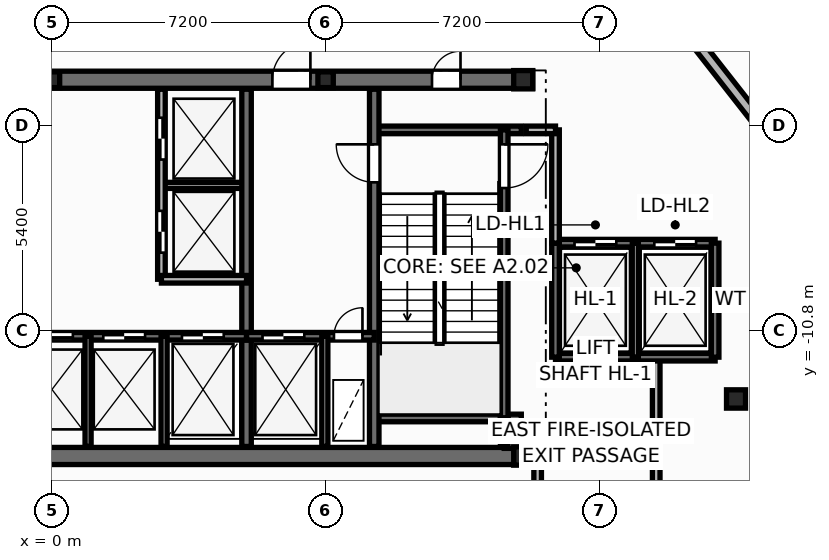
"""IFC4 building model, lengths in metres.
Left out: names, types, materials, properties, quantities, classifications, styles, units other than length and angle.
Written with IfcOpenShell. Run it as: python <this file> out.ifc"""

import sys

from ifc_helpers import new_model, si_unit, direction, frame, frame_2d, origin, origin_2d, place, context, subcontext, project, spatial, rectangle, i_section, extrude, element, fill, save


model = new_model("IFC4")
c1 = context("Model", 3, precision=1e-05, world=origin(), true_north=direction((0.0, 1.0)))
c2 = subcontext(c1, "Body", "Model", "MODEL_VIEW")
j1 = project(units=[si_unit("LENGTHUNIT", "METRE"), si_unit("PLANEANGLEUNIT", "RADIAN")], contexts=[c1])
p1 = place(None, origin())
s1 = spatial("IfcSite", under=j1, at=p1, CompositionType="ELEMENT")
p2 = place(p1, origin())
s2 = spatial("IfcBuilding", under=s1, at=p2, CompositionType="ELEMENT")
p3 = place(p2, origin())
s3 = spatial("IfcBuildingStorey", under=s2, at=p3, CompositionType="ELEMENT", Elevation=0.0)
for number, where, z_axis, x_axis in (
    (1, (12.4, -14.1, 0.0), (0.0, 0.0, 1.0), (1.0, 0.0, 0.0)),
    (2, (12.4, -4.2, 0.0), (0.0, 0.0, 1.0), (1.0, 0.0, 0.0)),
):
    element("IfcColumn", number, at=place(p3, frame(where, z_axis=z_axis, x_axis=x_axis)), inside=s3, PredefinedType="COLUMN", context=c2, shape_type="SweptSolid", body=[
        extrude(i_section(OverallWidth=0.5, OverallDepth=0.482, WebThickness=0.04, FlangeThickness=0.045, at=origin_2d()), origin(), (0.0, 0.0, 1.0), 5.4),
    ])
for number, where, z_axis, x_axis in (
    (3, (0.0, -4.2, 0.0), (0.0, 0.0, 1.0), (1.0, 0.0, 0.0)),
    (4, (7.2, -4.2, 0.0), (0.0, 0.0, 1.0), (1.0, 0.0, 0.0)),
):
    element("IfcColumn", number, at=place(p3, frame(where, z_axis=z_axis, x_axis=x_axis)), inside=s3, PredefinedType="PILASTER", context=c2, shape_type="SweptSolid", body=[
        extrude(i_section(OverallWidth=0.405, OverallDepth=0.414, WebThickness=0.022, FlangeThickness=0.032, at=origin_2d()), origin(), (0.0, 0.0, 1.0), 5.4),
    ])
p4 = place(p3, frame((18.0, -12.6, 0.0), z_axis=(0.0, 0.0, 1.0), x_axis=(1.0, 0.0, 0.0)))
e5 = element("IfcColumn", 5, at=p4, inside=s3, PredefinedType="COLUMN", context=c2, shape_type="SweptSolid", body=[
    extrude(i_section(OverallWidth=0.5, OverallDepth=0.482, WebThickness=0.04, FlangeThickness=0.045, at=origin_2d()), origin(), (0.0, 0.0, 1.0), 5.4),
])
p5 = place(p3, frame((23.245, -11.24, -0.015), z_axis=(0.0, 0.0, 1.0), x_axis=(-0.616936653938, -0.787012811222, 0.0)))
e6 = element("IfcWall", 6, at=p5, inside=s3, PredefinedType="STANDARD", context=c2, shape_type="SweptSolid", body=[
    extrude(rectangle(XDim=8.399, YDim=0.28, at=frame_2d((4.199, 0.0))), origin(), (0.0, 0.0, 1.0), 5.135),
])
p6 = place(p5, frame((0.22, 0.0, 0.015)))
e7 = element("IfcOpeningElement", 7, at=p6, cuts=e6, PredefinedType="OPENING", context=c2, shape_type="SweptSolid", body=[
    extrude(rectangle(XDim=1.206, YDim=2.154, at=frame_2d((0.6, 1.077))), frame((0.0, 0.15, 0.0), z_axis=(0.0, -1.0, 0.0), x_axis=(1.0, 0.0, 0.0)), (0.0, 0.0, 1.0), 0.3),
])
p7 = place(p3, frame((5.583, 11.29, -0.015), z_axis=(0.0, 0.0, 1.0), x_axis=(0.616945483616, -0.787005889588, 0.0)))
e8 = element("IfcWall", 8, at=p7, inside=s3, PredefinedType="STANDARD", context=c2, shape_type="SweptSolid", body=[
    extrude(rectangle(XDim=28.627, YDim=0.28, at=frame_2d((14.314, 0.0))), origin(), (0.0, 0.0, 1.0), 3.91),
])
p8 = place(p7, frame((2.979, 0.0, 0.015)))
e9 = element("IfcOpeningElement", 9, at=p8, cuts=e8, PredefinedType="OPENING", context=c2, shape_type="SweptSolid", body=[
    extrude(rectangle(XDim=1.206, YDim=2.154, at=frame_2d((0.6, 1.077))), frame((0.0, 0.15, 0.0), z_axis=(0.0, -1.0, 0.0), x_axis=(1.0, 0.0, 0.0)), (0.0, 0.0, 1.0), 0.3),
])
p9 = place(p3, frame((2.88, -6.98, 0.0), z_axis=(0.0, 0.0, 1.0), x_axis=(1.0, 0.0, 0.0)))
e10 = element("IfcWall", 10, at=p9, inside=s3, PredefinedType="PARTITIONING", context=c2, shape_type="SweptSolid", body=[
    extrude(rectangle(XDim=2.24, YDim=0.16, at=frame_2d((1.12, 0.0))), origin(), (0.0, 0.0, 1.0), 5.12),
])
p10 = place(p3, frame((-12.75, -14.1, 0.0), z_axis=(0.0, 0.0, 1.0), x_axis=(1.0, 0.0, 0.0)))
e11 = element("IfcWall", 11, at=p10, inside=s3, PredefinedType="SHEAR", context=c2, shape_type="SweptSolid", body=[
    extrude(rectangle(XDim=25.5, YDim=0.45, at=frame_2d((12.75, 0.0))), origin(), (0.0, 0.0, 1.0), 5.4),
])
p11 = place(p3, frame((-12.65, -4.2, 0.0), z_axis=(0.0, 0.0, 1.0), x_axis=(1.0, 0.0, 0.0)))
e12 = element("IfcWall", 12, at=p11, inside=s3, PredefinedType="SHEAR", context=c2, shape_type="SweptSolid", body=[
    extrude(rectangle(XDim=25.3, YDim=0.45, at=frame_2d((12.65, 0.0))), origin(), (0.0, 0.0, 1.0), 5.4),
])
p12 = place(p11, frame((1.85, 0.0, 0.0)))
e13 = element("IfcOpeningElement", 13, at=p12, cuts=e12, PredefinedType="OPENING", context=c2, shape_type="SweptSolid", body=[
    extrude(rectangle(XDim=0.756, YDim=2.054, at=frame_2d((0.375, 1.027))), frame((0.0, 0.235, 0.0), z_axis=(0.0, -1.0, 0.0), x_axis=(1.0, 0.0, 0.0)), (0.0, 0.0, 1.0), 0.47),
])
p13 = place(p11, frame((22.65, 0.0, 0.0)))
e14 = element("IfcOpeningElement", 14, at=p13, cuts=e12, PredefinedType="OPENING", context=c2, shape_type="SweptSolid", body=[
    extrude(rectangle(XDim=0.756, YDim=2.054, at=frame_2d((0.375, 1.027))), frame((0.0, 0.235, 0.0), z_axis=(0.0, -1.0, 0.0), x_axis=(1.0, 0.0, 0.0)), (0.0, 0.0, 1.0), 0.47),
])
p14 = place(p11, frame((5.85, 0.0, 0.0)))
e15 = element("IfcOpeningElement", 15, at=p14, cuts=e12, PredefinedType="OPENING", context=c2, shape_type="SweptSolid", body=[
    extrude(rectangle(XDim=1.006, YDim=2.104, at=frame_2d((0.5, 1.052))), frame((0.0, 0.235, 0.0), z_axis=(0.0, -1.0, 0.0), x_axis=(1.0, 0.0, 0.0)), (0.0, 0.0, 1.0), 0.47),
])
p15 = place(p11, frame((10.35, 0.0, 0.0)))
e16 = element("IfcOpeningElement", 16, at=p15, cuts=e12, PredefinedType="OPENING", context=c2, shape_type="SweptSolid", body=[
    extrude(rectangle(XDim=1.406, YDim=2.154, at=frame_2d((0.7, 1.077))), frame((0.0, 0.235, 0.0), z_axis=(0.0, -1.0, 0.0), x_axis=(1.0, 0.0, 0.0)), (0.0, 0.0, 1.0), 0.47),
])
p16 = place(p11, frame((18.45, 0.0, 0.0)))
e17 = element("IfcOpeningElement", 17, at=p16, cuts=e12, PredefinedType="OPENING", context=c2, shape_type="SweptSolid", body=[
    extrude(rectangle(XDim=1.006, YDim=2.104, at=frame_2d((0.5, 1.052))), frame((0.0, 0.235, 0.0), z_axis=(0.0, -1.0, 0.0), x_axis=(1.0, 0.0, 0.0)), (0.0, 0.0, 1.0), 0.47),
])
for number, where, z_axis, x_axis in (
    (18, (8.48, -5.52, 0.0), (0.0, 0.0, 1.0), (1.0, 0.0, 0.0)),
    (19, (8.48, -13.1, 0.0), (0.0, 0.0, 1.0), (1.0, 0.0, 0.0)),
):
    element("IfcWall", number, at=place(p3, frame(where, z_axis=z_axis, x_axis=x_axis)), inside=s3, PredefinedType="SOLIDWALL", context=c2, shape_type="SweptSolid", body=[
        extrude(rectangle(XDim=3.87, YDim=0.2, at=frame_2d((1.935, 0.0))), origin(), (0.0, 0.0, 1.0), 5.4),
    ])
p17 = place(p3, frame((11.9, -5.52, 0.0), z_axis=(0.0, 0.0, 1.0), x_axis=(0.0, -1.0, 0.0)))
e20 = element("IfcWall", 20, at=p17, inside=s3, PredefinedType="SOLIDWALL", context=c2, shape_type="SweptSolid", body=[
    extrude(rectangle(XDim=7.58, YDim=0.2, at=frame_2d((3.79, 0.0))), origin(), (0.0, 0.0, 1.0), 5.4),
])
p18 = place(p17, frame((0.38, 0.0, 0.0)))
e21 = element("IfcOpeningElement", 21, at=p18, cuts=e20, PredefinedType="OPENING", context=c2, shape_type="SweptSolid", body=[
    extrude(rectangle(XDim=1.156, YDim=2.154, at=frame_2d((0.575, 1.077))), frame((0.0, 0.11, 0.0), z_axis=(0.0, -1.0, 0.0), x_axis=(1.0, 0.0, 0.0)), (0.0, 0.0, 1.0), 0.22),
])
p19 = place(p3, frame((8.48, -13.85, 0.0), z_axis=(0.0, 0.0, 1.0), x_axis=(0.0, 1.0, 0.0)))
e22 = element("IfcWall", 22, at=p19, inside=s3, PredefinedType="SHEAR", context=c2, shape_type="SweptSolid", body=[
    extrude(rectangle(XDim=9.4, YDim=0.25, at=frame_2d((4.7, 0.0))), origin(), (0.0, 0.0, 1.0), 5.4),
])
p20 = place(p19, frame((6.95, 0.0, 0.0)))
e23 = element("IfcOpeningElement", 23, at=p20, cuts=e22, PredefinedType="OPENING", context=c2, shape_type="SweptSolid", body=[
    extrude(rectangle(XDim=1.006, YDim=2.104, at=frame_2d((0.5, 1.052))), frame((0.0, 0.135, 0.0), z_axis=(0.0, -1.0, 0.0), x_axis=(1.0, 0.0, 0.0)), (0.0, 0.0, 1.0), 0.27),
])
p21 = place(p3, frame((5.12, -13.85, 0.0), z_axis=(0.0, 0.0, 1.0), x_axis=(0.0, 1.0, 0.0)))
e24 = element("IfcWall", 24, at=p21, inside=s3, PredefinedType="SHEAR", context=c2, shape_type="SweptSolid", body=[
    extrude(rectangle(XDim=9.4, YDim=0.25, at=frame_2d((4.7, 0.0))), origin(), (0.0, 0.0, 1.0), 5.4),
])
p22 = place(p3, frame((-5.12, -10.95, 0.0), z_axis=(0.0, 0.0, 1.0), x_axis=(1.0, 0.0, 0.0)))
e25 = element("IfcWall", 25, at=p22, inside=s3, PredefinedType="SOLIDWALL", context=c2, shape_type="SweptSolid", body=[
    extrude(rectangle(XDim=10.24, YDim=0.2, at=frame_2d((5.12, 0.0))), origin(), (0.0, 0.0, 1.0), 5.4),
])
p23 = place(p22, frame((0.6, 0.0, 0.0)))
e26 = element("IfcOpeningElement", 26, at=p23, cuts=e25, PredefinedType="OPENING", context=c2, shape_type="SweptSolid", body=[
    extrude(rectangle(XDim=1.106, YDim=2.104, at=frame_2d((0.55, 1.052))), frame((0.0, 0.11, 0.0), z_axis=(0.0, -1.0, 0.0), x_axis=(1.0, 0.0, 0.0)), (0.0, 0.0, 1.0), 0.22),
])
p24 = place(p22, frame((2.67, 0.0, 0.0)))
e27 = element("IfcOpeningElement", 27, at=p24, cuts=e25, PredefinedType="OPENING", context=c2, shape_type="SweptSolid", body=[
    extrude(rectangle(XDim=1.106, YDim=2.104, at=frame_2d((0.55, 1.052))), frame((0.0, 0.11, 0.0), z_axis=(0.0, -1.0, 0.0), x_axis=(1.0, 0.0, 0.0)), (0.0, 0.0, 1.0), 0.22),
])
p25 = place(p22, frame((4.57, 0.0, 0.0)))
e28 = element("IfcOpeningElement", 28, at=p25, cuts=e25, PredefinedType="OPENING", context=c2, shape_type="SweptSolid", body=[
    extrude(rectangle(XDim=1.106, YDim=2.104, at=frame_2d((0.55, 1.052))), frame((0.0, 0.11, 0.0), z_axis=(0.0, -1.0, 0.0), x_axis=(1.0, 0.0, 0.0)), (0.0, 0.0, 1.0), 0.22),
])
p26 = place(p22, frame((6.47, 0.0, 0.0)))
e29 = element("IfcOpeningElement", 29, at=p26, cuts=e25, PredefinedType="OPENING", context=c2, shape_type="SweptSolid", body=[
    extrude(rectangle(XDim=1.106, YDim=2.104, at=frame_2d((0.55, 1.052))), frame((0.0, 0.11, 0.0), z_axis=(0.0, -1.0, 0.0), x_axis=(1.0, 0.0, 0.0)), (0.0, 0.0, 1.0), 0.22),
])
p27 = place(p22, frame((8.54, 0.0, 0.0)))
e30 = element("IfcOpeningElement", 30, at=p27, cuts=e25, PredefinedType="OPENING", context=c2, shape_type="SweptSolid", body=[
    extrude(rectangle(XDim=1.106, YDim=2.104, at=frame_2d((0.55, 1.052))), frame((0.0, 0.11, 0.0), z_axis=(0.0, -1.0, 0.0), x_axis=(1.0, 0.0, 0.0)), (0.0, 0.0, 1.0), 0.22),
])
p28 = place(p3, frame((5.12, -10.95, 0.0), z_axis=(0.0, 0.0, 1.0), x_axis=(1.0, 0.0, 0.0)))
e31 = element("IfcWall", 31, at=p28, inside=s3, PredefinedType="SOLIDWALL", context=c2, shape_type="SweptSolid", body=[
    extrude(rectangle(XDim=3.36, YDim=0.2, at=frame_2d((1.68, 0.0))), origin(), (0.0, 0.0, 1.0), 5.4),
])
p29 = place(p28, frame((0.42, 0.0, 0.0)))
e32 = element("IfcOpeningElement", 32, at=p29, cuts=e31, PredefinedType="OPENING", context=c2, shape_type="SweptSolid", body=[
    extrude(rectangle(XDim=1.106, YDim=2.104, at=frame_2d((0.55, 1.052))), frame((0.0, 0.11, 0.0), z_axis=(0.0, -1.0, 0.0), x_axis=(1.0, 0.0, 0.0)), (0.0, 0.0, 1.0), 0.22),
])
p30 = place(p28, frame((2.3, 0.0, 0.0)))
e33 = element("IfcOpeningElement", 33, at=p30, cuts=e31, PredefinedType="OPENING", context=c2, shape_type="SweptSolid", body=[
    extrude(rectangle(XDim=0.756, YDim=2.054, at=frame_2d((0.375, 1.027))), frame((0.0, 0.11, 0.0), z_axis=(0.0, -1.0, 0.0), x_axis=(1.0, 0.0, 0.0)), (0.0, 0.0, 1.0), 0.22),
])
for number, where, z_axis, x_axis in (
    (34, (7.18, -13.85, 0.0), (0.0, 0.0, 1.0), (0.0, 1.0, 0.0)),
    (35, (2.95, -13.85, 0.0), (0.0, 0.0, 1.0), (0.0, 1.0, 0.0)),
):
    element("IfcWall", number, at=place(p3, frame(where, z_axis=z_axis, x_axis=x_axis)), inside=s3, PredefinedType="PARTITIONING", context=c2, shape_type="SweptSolid", body=[
        extrude(rectangle(XDim=2.9, YDim=0.16, at=frame_2d((1.45, 0.0))), origin(), (0.0, 0.0, 1.0), 4.145),
    ])
p31 = place(p3, frame((2.88, -9.45, 0.0), z_axis=(0.0, 0.0, 1.0), x_axis=(0.0, 1.0, 0.0)))
e36 = element("IfcWall", 36, at=p31, inside=s3, PredefinedType="SOLIDWALL", context=c2, shape_type="SweptSolid", body=[
    extrude(rectangle(XDim=5.0, YDim=0.2, at=frame_2d((2.5, 0.0))), origin(), (0.0, 0.0, 1.0), 5.12),
])
p32 = place(p31, frame((0.7, 0.0, 0.0)))
e37 = element("IfcOpeningElement", 37, at=p32, cuts=e36, PredefinedType="OPENING", context=c2, shape_type="SweptSolid", body=[
    extrude(rectangle(XDim=1.106, YDim=2.104, at=frame_2d((0.55, 1.052))), frame((0.0, 0.11, 0.0), z_axis=(0.0, -1.0, 0.0), x_axis=(1.0, 0.0, 0.0)), (0.0, 0.0, 1.0), 0.22),
])
p33 = place(p31, frame((3.15, 0.0, 0.0)))
e38 = element("IfcOpeningElement", 38, at=p33, cuts=e36, PredefinedType="OPENING", context=c2, shape_type="SweptSolid", body=[
    extrude(rectangle(XDim=1.106, YDim=2.104, at=frame_2d((0.55, 1.052))), frame((0.0, 0.11, 0.0), z_axis=(0.0, -1.0, 0.0), x_axis=(1.0, 0.0, 0.0)), (0.0, 0.0, 1.0), 0.22),
])
p34 = place(p3, frame((2.88, -9.45, 0.0), z_axis=(0.0, 0.0, 1.0), x_axis=(1.0, 0.0, 0.0)))
e39 = element("IfcWall", 39, at=p34, inside=s3, PredefinedType="SOLIDWALL", context=c2, shape_type="SweptSolid", body=[
    extrude(rectangle(XDim=2.24, YDim=0.2, at=frame_2d((1.12, 0.0))), origin(), (0.0, 0.0, 1.0), 5.12),
])
p35 = place(p3, frame((0.95, -13.85, 0.0), z_axis=(0.0, 0.0, 1.0), x_axis=(0.0, 1.0, 0.0)))
e40 = element("IfcWall", 40, at=p35, inside=s3, PredefinedType="PARTITIONING", context=c2, shape_type="SweptSolid", body=[
    extrude(rectangle(XDim=2.9, YDim=0.16, at=frame_2d((1.45, 0.0))), origin(), (0.0, 0.0, 1.0), 4.145),
])
p36 = place(p3, frame((15.9, -17.85, 0.0), z_axis=(0.0, 0.0, 1.0), x_axis=(0.0, 1.0, 0.0)))
e41 = element("IfcWall", 41, at=p36, inside=s3, PredefinedType="SOLIDWALL", context=c2, shape_type="SweptSolid", body=[
    extrude(rectangle(XDim=6.35, YDim=0.2, at=frame_2d((3.175, 0.0))), origin(), (0.0, 0.0, 1.0), 5.12),
])
p37 = place(p3, frame((13.25, -11.5, 0.0), z_axis=(0.0, 0.0, 1.0), x_axis=(1.0, 0.0, 0.0)))
e42 = element("IfcWall", 42, at=p37, inside=s3, PredefinedType="SOLIDWALL", context=c2, shape_type="SweptSolid", body=[
    extrude(rectangle(XDim=4.2, YDim=0.2, at=frame_2d((2.1, 0.0))), origin(), (0.0, 0.0, 1.0), 5.4),
])
p38 = place(p3, frame((13.25, -8.5, 0.0), z_axis=(0.0, 0.0, 1.0), x_axis=(1.0, 0.0, 0.0)))
e43 = element("IfcWall", 43, at=p38, inside=s3, PredefinedType="SOLIDWALL", context=c2, shape_type="SweptSolid", body=[
    extrude(rectangle(XDim=4.2, YDim=0.2, at=frame_2d((2.1, 0.0))), origin(), (0.0, 0.0, 1.0), 5.4),
])
p39 = place(p38, frame((0.5, 0.0, 0.0)))
e44 = element("IfcOpeningElement", 44, at=p39, cuts=e43, PredefinedType="OPENING", context=c2, shape_type="SweptSolid", body=[
    extrude(rectangle(XDim=1.106, YDim=2.104, at=frame_2d((0.55, 1.052))), frame((0.0, 0.11, 0.0), z_axis=(0.0, -1.0, 0.0), x_axis=(1.0, 0.0, 0.0)), (0.0, 0.0, 1.0), 0.22),
])
p40 = place(p38, frame((2.6, 0.0, 0.0)))
e45 = element("IfcOpeningElement", 45, at=p40, cuts=e43, PredefinedType="OPENING", context=c2, shape_type="SweptSolid", body=[
    extrude(rectangle(XDim=1.106, YDim=2.104, at=frame_2d((0.55, 1.052))), frame((0.0, 0.11, 0.0), z_axis=(0.0, -1.0, 0.0), x_axis=(1.0, 0.0, 0.0)), (0.0, 0.0, 1.0), 0.22),
])
p41 = place(p3, frame((12.78, -17.85, 0.0), z_axis=(0.0, 0.0, 1.0), x_axis=(0.0, 1.0, 0.0)))
e46 = element("IfcWall", 46, at=p41, inside=s3, PredefinedType="SOLIDWALL", context=c2, shape_type="SweptSolid", body=[
    extrude(rectangle(XDim=4.05, YDim=0.2, at=frame_2d((2.025, 0.0))), origin(), (0.0, 0.0, 1.0), 5.12),
])
for number, where, z_axis, x_axis in (
    (47, (13.25, -11.5, 0.0), (0.0, 0.0, 1.0), (0.0, 1.0, 0.0)),
    (48, (17.45, -11.5, 0.0), (0.0, 0.0, 1.0), (0.0, 1.0, 0.0)),
):
    element("IfcWall", number, at=place(p3, frame(where, z_axis=z_axis, x_axis=x_axis)), inside=s3, PredefinedType="SOLIDWALL", context=c2, shape_type="SweptSolid", body=[
        extrude(rectangle(XDim=3.0, YDim=0.2, at=frame_2d((1.5, 0.0))), origin(), (0.0, 0.0, 1.0), 5.4),
    ])
p42 = place(p3, frame((15.35, -11.5, 0.0), z_axis=(0.0, 0.0, 1.0), x_axis=(0.0, 1.0, 0.0)))
e49 = element("IfcWall", 49, at=p42, inside=s3, PredefinedType="PARTITIONING", context=c2, shape_type="SweptSolid", body=[
    extrude(rectangle(XDim=3.0, YDim=0.16, at=frame_2d((1.5, 0.0))), origin(), (0.0, 0.0, 1.0), 5.12),
])
p43 = place(p3, frame((13.25, -8.5, 0.0), z_axis=(0.0, 0.0, 1.0), x_axis=(0.0, 1.0, 0.0)))
e50 = element("IfcWall", 50, at=p43, inside=s3, PredefinedType="SOLIDWALL", context=c2, shape_type="SweptSolid", body=[
    extrude(rectangle(XDim=2.98, YDim=0.2, at=frame_2d((1.49, 0.0))), origin(), (0.0, 0.0, 1.0), 5.12),
])
p44 = place(p3, frame((11.9, -13.8, 0.0), z_axis=(0.0, 0.0, 1.0), x_axis=(1.0, 0.0, 0.0)))
e51 = element("IfcWall", 51, at=p44, inside=s3, PredefinedType="SOLIDWALL", context=c2, shape_type="SweptSolid", body=[
    extrude(rectangle(XDim=0.88, YDim=0.2, at=frame_2d((0.44, 0.0))), origin(), (0.0, 0.0, 1.0), 4.483),
])
p45 = place(p3, frame((12.48, -5.52, 0.0), z_axis=(0.0, 0.0, 1.0), x_axis=(1.0, 0.0, 0.0)))
e52 = element("IfcWall", 52, at=p45, inside=s3, PredefinedType="SOLIDWALL", context=c2, shape_type="SweptSolid", body=[
    extrude(rectangle(XDim=0.77, YDim=0.2, at=frame_2d((0.385, 0.0))), origin(), (0.0, 0.0, 1.0), 4.483),
])
p46 = place(p3, frame((11.9, -13.8, 0.0), z_axis=(0.0, 0.0, 1.0), x_axis=(0.0, 1.0, 0.0)))
e53 = element("IfcWall", 53, at=p46, inside=s3, PredefinedType="SOLIDWALL", context=c2, shape_type="SweptSolid", body=[
    extrude(rectangle(XDim=0.7, YDim=0.2, at=frame_2d((0.35, 0.0))), origin(), (0.0, 0.0, 1.0), 5.12),
])
p47 = place(p32, origin())
e54 = element("IfcDoor", 54, at=p47, inside=s3, OperationType="DOUBLE_DOOR_SLIDING", PredefinedType="DOOR", context=c2, shape_type="SweptSolid", body=[
    extrude(rectangle(XDim=1.1, YDim=2.1, at=frame_2d((0.55, 1.05))), frame((0.0, 0.025, 0.0), z_axis=(0.0, -1.0, 0.0), x_axis=(1.0, 0.0, 0.0)), (0.0, 0.0, 1.0), 0.05),
])
fill(e37, e54)
p48 = place(p33, origin())
e55 = element("IfcDoor", 55, at=p48, inside=s3, OperationType="DOUBLE_DOOR_SLIDING", PredefinedType="DOOR", context=c2, shape_type="SweptSolid", body=[
    extrude(rectangle(XDim=1.1, YDim=2.1, at=frame_2d((0.55, 1.05))), frame((0.0, 0.025, 0.0), z_axis=(0.0, -1.0, 0.0), x_axis=(1.0, 0.0, 0.0)), (0.0, 0.0, 1.0), 0.05),
])
fill(e38, e55)
p49 = place(p20, origin())
e56 = element("IfcDoor", 56, at=p49, inside=s3, OperationType="SINGLE_SWING_RIGHT", PredefinedType="DOOR", context=c2, shape_type="SweptSolid", body=[
    extrude(rectangle(XDim=1.0, YDim=2.1, at=frame_2d((0.5, 1.05))), frame((0.0, 0.025, 0.0), z_axis=(0.0, -1.0, 0.0), x_axis=(1.0, 0.0, 0.0)), (0.0, 0.0, 1.0), 0.05),
])
fill(e23, e56)
p50 = place(p18, origin())
e57 = element("IfcDoor", 57, at=p50, inside=s3, OperationType="SINGLE_SWING_LEFT", PredefinedType="DOOR", context=c2, shape_type="SweptSolid", body=[
    extrude(rectangle(XDim=1.15, YDim=2.15, at=frame_2d((0.575, 1.075))), frame((0.0, 0.025, 0.0), z_axis=(0.0, -1.0, 0.0), x_axis=(1.0, 0.0, 0.0)), (0.0, 0.0, 1.0), 0.05),
])
fill(e21, e57)
p51 = place(p29, origin())
e58 = element("IfcDoor", 58, at=p51, inside=s3, OperationType="DOUBLE_DOOR_SLIDING", PredefinedType="DOOR", context=c2, shape_type="SweptSolid", body=[
    extrude(rectangle(XDim=1.1, YDim=2.1, at=frame_2d((0.55, 1.05))), frame((0.0, 0.025, 0.0), z_axis=(0.0, -1.0, 0.0), x_axis=(1.0, 0.0, 0.0)), (0.0, 0.0, 1.0), 0.05),
])
fill(e32, e58)
p52 = place(p30, origin())
e59 = element("IfcDoor", 59, at=p52, inside=s3, OperationType="SINGLE_SWING_RIGHT", PredefinedType="DOOR", context=c2, shape_type="SweptSolid", body=[
    extrude(rectangle(XDim=0.75, YDim=2.05, at=frame_2d((0.375, 1.025))), frame((0.0, 0.025, 0.0), z_axis=(0.0, -1.0, 0.0), x_axis=(1.0, 0.0, 0.0)), (0.0, 0.0, 1.0), 0.05),
])
fill(e33, e59)
p53 = place(p25, origin())
e60 = element("IfcDoor", 60, at=p53, inside=s3, OperationType="DOUBLE_DOOR_SLIDING", PredefinedType="DOOR", context=c2, shape_type="SweptSolid", body=[
    extrude(rectangle(XDim=1.1, YDim=2.1, at=frame_2d((0.55, 1.05))), frame((0.0, 0.025, 0.0), z_axis=(0.0, -1.0, 0.0), x_axis=(1.0, 0.0, 0.0)), (0.0, 0.0, 1.0), 0.05),
])
fill(e28, e60)
p54 = place(p26, origin())
e61 = element("IfcDoor", 61, at=p54, inside=s3, OperationType="DOUBLE_DOOR_SLIDING", PredefinedType="DOOR", context=c2, shape_type="SweptSolid", body=[
    extrude(rectangle(XDim=1.1, YDim=2.1, at=frame_2d((0.55, 1.05))), frame((0.0, 0.025, 0.0), z_axis=(0.0, -1.0, 0.0), x_axis=(1.0, 0.0, 0.0)), (0.0, 0.0, 1.0), 0.05),
])
fill(e29, e61)
p55 = place(p27, origin())
e62 = element("IfcDoor", 62, at=p55, inside=s3, OperationType="DOUBLE_DOOR_SLIDING", PredefinedType="DOOR", context=c2, shape_type="SweptSolid", body=[
    extrude(rectangle(XDim=1.1, YDim=2.1, at=frame_2d((0.55, 1.05))), frame((0.0, 0.025, 0.0), z_axis=(0.0, -1.0, 0.0), x_axis=(1.0, 0.0, 0.0)), (0.0, 0.0, 1.0), 0.05),
])
fill(e30, e62)
p56 = place(p13, origin())
e63 = element("IfcDoor", 63, at=p56, inside=s3, OperationType="SINGLE_SWING_RIGHT", PredefinedType="DOOR", context=c2, shape_type="SweptSolid", body=[
    extrude(rectangle(XDim=0.75, YDim=2.05, at=frame_2d((0.375, 1.025))), frame((0.0, 0.025, 0.0), z_axis=(0.0, -1.0, 0.0), x_axis=(1.0, 0.0, 0.0)), (0.0, 0.0, 1.0), 0.05),
])
fill(e14, e63)
p57 = place(p16, origin())
e64 = element("IfcDoor", 64, at=p57, inside=s3, OperationType="SINGLE_SWING_RIGHT", PredefinedType="DOOR", context=c2, shape_type="SweptSolid", body=[
    extrude(rectangle(XDim=1.0, YDim=2.1, at=frame_2d((0.5, 1.05))), frame((0.0, 0.025, 0.0), z_axis=(0.0, -1.0, 0.0), x_axis=(1.0, 0.0, 0.0)), (0.0, 0.0, 1.0), 0.05),
])
fill(e17, e64)
p58 = place(p39, origin())
e65 = element("IfcDoor", 65, at=p58, inside=s3, OperationType="DOUBLE_DOOR_SLIDING", PredefinedType="DOOR", context=c2, shape_type="SweptSolid", body=[
    extrude(rectangle(XDim=1.1, YDim=2.1, at=frame_2d((0.55, 1.05))), frame((0.0, 0.025, 0.0), z_axis=(0.0, -1.0, 0.0), x_axis=(1.0, 0.0, 0.0)), (0.0, 0.0, 1.0), 0.05),
])
fill(e44, e65)
p59 = place(p40, origin())
e66 = element("IfcDoor", 66, at=p59, inside=s3, OperationType="DOUBLE_DOOR_SLIDING", PredefinedType="DOOR", context=c2, shape_type="SweptSolid", body=[
    extrude(rectangle(XDim=1.1, YDim=2.1, at=frame_2d((0.55, 1.05))), frame((0.0, 0.025, 0.0), z_axis=(0.0, -1.0, 0.0), x_axis=(1.0, 0.0, 0.0)), (0.0, 0.0, 1.0), 0.05),
])
fill(e45, e66)
save(model, sys.argv[1])
